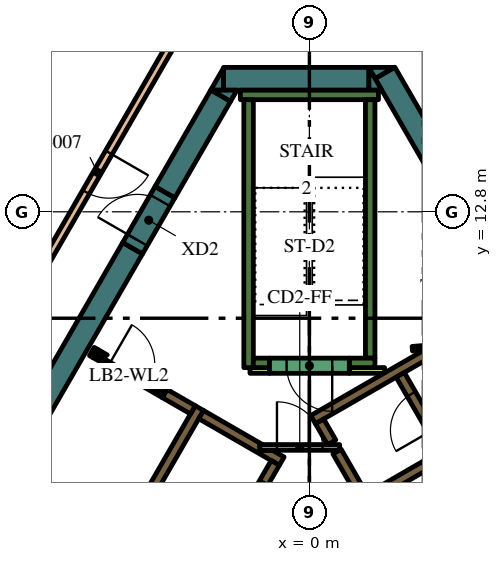
"""IFC4 building model, lengths in metres.
Left out: names, types, materials, properties, quantities, classifications, styles, units other than length and angle.
Written with IfcOpenShell. Run it as: python <this file> out.ifc"""

import sys

from ifc_helpers import new_model, si_unit, direction, frame, frame_2d, origin, place, context, subcontext, project, spatial, polyline, rectangle, outline, extrude, element, fill, save


model = new_model("IFC4")
c1 = context("Model", 3, precision=1e-05, world=origin(), true_north=direction((0.0, 1.0)))
c2 = subcontext(c1, "Body", "Model", "MODEL_VIEW")
j1 = project(units=[si_unit("LENGTHUNIT", "METRE"), si_unit("PLANEANGLEUNIT", "RADIAN")], contexts=[c1])
p1 = place(None, origin())
s1 = spatial("IfcSite", under=j1, at=p1, CompositionType="ELEMENT")
p2 = place(p1, origin())
s2 = spatial("IfcBuilding", under=s1, at=p2, CompositionType="ELEMENT")
p3 = place(p2, frame((0.0, 0.0, 331.8)))
s3 = spatial("IfcBuildingStorey", under=s2, at=p3, CompositionType="ELEMENT", Elevation=331.8)
p4 = place(p3, frame((1.989, 16.456, 0.0), z_axis=(0.0, 0.0, 1.0), x_axis=(0.49999102663, -0.8660305845, 0.0)))
e1 = element("IfcWall", 1, at=p4, inside=s3, PredefinedType="SOLIDWALL", context=c2, shape_type="SweptSolid", body=[
    extrude(rectangle(XDim=12.406, YDim=0.6, at=frame_2d((6.203, 0.0))), origin(), (0.0, 0.0, 1.0), 4.2),
])
p5 = place(p3, origin())
e2 = element("IfcWall", 2, at=p5, inside=s3, PredefinedType="SOLIDWALL", context=c2, shape_type="SweptSolid", body=[
    extrude(outline(polyline([(1.559, 16.6), (2.235, 16.6), (1.728, 16.307), (1.559, 16.6)])), origin(), (0.0, 0.0, 1.0), 4.2),
])
p6 = place(p3, frame((-2.258, 16.3, 0.0), z_axis=(0.0, 0.0, 1.0), x_axis=(1.0, 0.0, 0.0)))
e3 = element("IfcWall", 3, at=p6, inside=s3, PredefinedType="SOLIDWALL", context=c2, shape_type="SweptSolid", body=[
    extrude(rectangle(XDim=3.823, YDim=0.6, at=frame_2d((1.912, 0.0))), origin(), (0.0, 0.0, 1.0), 4.2),
])
e4 = element("IfcWall", 4, at=p5, inside=s3, PredefinedType="SOLIDWALL", context=c2, shape_type="SweptSolid", body=[
    extrude(outline(polyline([(1.905, 16.0), (1.567, 16.0), (1.567, 16.585), (1.905, 16.0)])), origin(), (0.0, 0.0, 1.0), 4.2),
])
e5 = element("IfcWall", 5, at=p5, inside=s3, PredefinedType="SOLIDWALL", context=c2, shape_type="SweptSolid", body=[
    extrude(outline(polyline([(-2.598, 16.0), (-2.26, 16.585), (-2.26, 16.0), (-2.598, 16.0)])), origin(), (0.0, 0.0, 1.0), 4.2),
])
p7 = place(p3, frame((-2.335, 15.855, 0.0), z_axis=(0.0, 0.0, 1.0), x_axis=(-0.499960127962, -0.866048422692, 0.0)))
e6 = element("IfcWall", 6, at=p7, inside=s3, PredefinedType="SOLIDWALL", context=c2, shape_type="SweptSolid", body=[
    extrude(rectangle(XDim=2.934, YDim=0.6, at=frame_2d((1.467, 0.0))), origin(), (0.0, 0.0, 1.0), 4.2),
])
e7 = element("IfcWall", 7, at=p5, inside=s3, PredefinedType="SOLIDWALL", context=c2, shape_type="SweptSolid", body=[
    extrude(outline(polyline([(-1.905, 16.0), (-2.074, 15.707), (-2.581, 16.0), (-1.905, 16.0)])), origin(), (0.0, 0.0, 1.0), 4.2),
])
p8 = place(p3, frame((-4.652, 11.842, 0.0), z_axis=(0.0, 0.0, 1.0), x_axis=(-0.500003640647, -0.866023301845, 0.0)))
e8 = element("IfcWall", 8, at=p8, inside=s3, PredefinedType="SOLIDWALL", context=c2, shape_type="SweptSolid", body=[
    extrude(rectangle(XDim=15.858, YDim=0.6, at=frame_2d((7.929, 0.0))), origin(), (0.0, 0.0, 1.0), 4.2),
])
p9 = place(p3, frame((-1.817, 15.875, 0.0), z_axis=(0.0, 0.0, 1.0), x_axis=(1.0, 0.0, 0.0)))
e9 = element("IfcWall", 9, at=p9, inside=s3, PredefinedType="SOLIDWALL", context=c2, shape_type="SweptSolid", body=[
    extrude(rectangle(XDim=3.634, YDim=0.25, at=frame_2d((1.817, 0.0))), origin(), (0.0, 0.0, 1.0), 4.2),
])
p10 = place(p3, frame((1.6, 8.95, 0.0), z_axis=(0.0, 0.0, 1.0), x_axis=(0.0, 1.0, 0.0)))
e10 = element("IfcWall", 10, at=p10, inside=s3, PredefinedType="SOLIDWALL", context=c2, shape_type="SweptSolid", body=[
    extrude(rectangle(XDim=6.8, YDim=0.25, at=frame_2d((3.4, 0.0))), origin(), (0.0, 0.0, 1.0), 4.2),
])
p11 = place(p3, frame((1.05, 8.825, 0.0), z_axis=(0.0, 0.0, 1.0), x_axis=(1.0, 0.0, 0.0)))
e11 = element("IfcWall", 11, at=p11, inside=s3, PredefinedType="SOLIDWALL", context=c2, shape_type="SweptSolid", body=[
    extrude(rectangle(XDim=0.675, YDim=0.25, at=frame_2d((0.337, 0.0))), origin(), (0.0, 0.0, 1.0), 4.2),
])
p12 = place(p3, frame((-1.6, 8.7, 0.0), z_axis=(0.0, 0.0, 1.0), x_axis=(0.0, 1.0, 0.0)))
e12 = element("IfcWall", 12, at=p12, inside=s3, PredefinedType="SOLIDWALL", context=c2, shape_type="SweptSolid", body=[
    extrude(rectangle(XDim=7.05, YDim=0.25, at=frame_2d((3.525, 0.0))), origin(), (0.0, 0.0, 1.0), 4.2),
])
p13 = place(p3, frame((-1.475, 8.825, 0.0), z_axis=(0.0, 0.0, 1.0), x_axis=(1.0, 0.0, 0.0)))
e13 = element("IfcWall", 13, at=p13, inside=s3, PredefinedType="SOLIDWALL", context=c2, shape_type="SweptSolid", body=[
    extrude(rectangle(XDim=0.425, YDim=0.25, at=frame_2d((0.212, 0.0))), origin(), (0.0, 0.0, 1.0), 4.2),
])
p14 = place(p3, frame((3.1, 9.064, 0.0), z_axis=(0.0, 0.0, 1.0), x_axis=(-0.866033137035, -0.499986605379, 0.0)))
e14 = element("IfcWall", 14, at=p14, inside=s3, PredefinedType="SOLIDWALL", context=c2, shape_type="SweptSolid", body=[
    extrude(rectangle(XDim=3.467, YDim=0.25, at=frame_2d((1.733, 0.0))), origin(), (0.0, 0.0, 1.0), 4.2),
])
p15 = place(p3, frame((0.268, 7.285, 0.0), z_axis=(0.0, 0.0, 1.0), x_axis=(0.500098681536, -0.865968422476, 0.0)))
e15 = element("IfcWall", 15, at=p15, inside=s3, PredefinedType="SOLIDWALL", context=c2, shape_type="SweptSolid", body=[
    extrude(rectangle(XDim=0.636, YDim=0.25, at=frame_2d((0.318, 0.0))), origin(), (0.0, 0.0, 1.0), 4.2),
])
p16 = place(p3, frame((5.97, -2.591, 0.0), z_axis=(0.0, 0.0, 1.0), x_axis=(-0.499994469932, 0.866028596547, 0.0)))
e16 = element("IfcWall", 16, at=p16, inside=s3, PredefinedType="SOLIDWALL", context=c2, shape_type="SweptSolid", body=[
    extrude(rectangle(XDim=10.488, YDim=0.25, at=frame_2d((5.244, 0.0))), origin(), (0.0, 0.0, 1.0), 4.2),
])
p17 = place(p3, frame((1.574, 5.274, 0.0), z_axis=(0.0, 0.0, 1.0), x_axis=(0.866028486751, 0.499994660107, 0.0)))
e17 = element("IfcWall", 17, at=p17, inside=s3, PredefinedType="SOLIDWALL", context=c2, shape_type="SweptSolid", body=[
    extrude(rectangle(XDim=2.2, YDim=0.25, at=frame_2d((1.1, 0.0))), origin(), (0.0, 0.0, 1.0), 4.2),
])
p18 = place(p3, frame((-8.06, -1.311, 0.0), z_axis=(0.0, 0.0, 1.0), x_axis=(0.50000273126, 0.866023826885, 0.0)))
e18 = element("IfcWall", 18, at=p18, inside=s3, PredefinedType="SOLIDWALL", context=c2, shape_type="SweptSolid", body=[
    extrude(rectangle(XDim=10.33, YDim=0.25, at=frame_2d((5.165, 0.0))), origin(), (0.0, 0.0, 1.0), 4.2),
])
e19 = element("IfcWall", 19, at=p5, inside=s3, PredefinedType="SOLIDWALL", context=c2, shape_type="SweptSolid", body=[
    extrude(outline(polyline([(-2.912, 7.356), (-2.787, 7.573), (-1.232, 6.675), (-1.303, 6.675), (-1.304, 6.675), (-1.304, 6.675), (-1.304, 6.525), (-1.304, 6.525), (-1.303, 6.525), (-0.971, 6.525), (-0.665, 6.348), (-0.79, 6.132), (-1.007, 6.257), (-1.007, 6.257), (-2.912, 7.356)])), origin(), (0.0, 0.0, 1.0), 4.2),
])
p19 = place(p3, frame((-5.725, 9.125, 0.0), z_axis=(0.0, 0.0, 1.0), x_axis=(0.866185586049, -0.49972245349, 0.0)))
e20 = element("IfcWall", 20, at=p19, inside=s3, PredefinedType="SOLIDWALL", context=c2, shape_type="SweptSolid", body=[
    extrude(rectangle(XDim=0.11, YDim=0.25, at=frame_2d((0.055, 0.0))), origin(), (0.0, 0.0, 1.0), 4.2),
])
p20 = place(p3, frame((-3.066, 7.59, 0.0), z_axis=(0.0, 0.0, 1.0), x_axis=(-0.866081358704, 0.49990307071, 0.0)))
e21 = element("IfcWall", 21, at=p20, inside=s3, PredefinedType="SOLIDWALL", context=c2, shape_type="SweptSolid", body=[
    extrude(rectangle(XDim=0.858, YDim=0.25, at=frame_2d((0.429, 0.0))), origin(), (0.0, 0.0, 1.0), 4.2),
])
e22 = element("IfcWall", 22, at=p5, inside=s3, PredefinedType="SOLIDWALL", context=c2, shape_type="SweptSolid", body=[
    extrude(outline(polyline([(-3.748, 8.128), (-3.813, 8.015), (-4.027, 8.139), (-4.017, 8.156), (-4.008, 8.173), (-4.0, 8.192), (-3.995, 8.21), (-3.991, 8.23), (-3.99, 8.25), (-3.99, 8.268), (-3.748, 8.128)])), origin(), (0.0, 0.0, 1.0), 4.2),
])
e23 = element("IfcWall", 23, at=p5, inside=s3, PredefinedType="SOLIDWALL", context=c2, shape_type="SweptSolid", body=[
    extrude(outline(polyline([(-5.689, 8.96), (-5.69, 8.961), (-5.565, 9.177), (-5.319, 9.035), (-5.335, 9.026), (-5.351, 9.015), (-5.366, 9.002), (-5.379, 8.988), (-5.392, 8.972), (-5.402, 8.956), (-5.412, 8.939), (-5.629, 9.064), (-5.629, 9.064), (-5.689, 8.96)])), origin(), (0.0, 0.0, 1.0), 4.2),
])
p21 = place(p3, frame((1.05, 8.625, 0.0), z_axis=(0.0, 0.0, 1.0), x_axis=(1.0, 0.0, 0.0)))
e24 = element("IfcWall", 24, at=p21, inside=s3, PredefinedType="PARTITIONING", context=c2, shape_type="SweptSolid", body=[
    extrude(rectangle(XDim=0.929, YDim=0.15, at=frame_2d((0.464, 0.0))), origin(), (0.0, 0.0, 1.0), 3.45),
])
p22 = place(p3, frame((-1.564, 8.625, 0.0), z_axis=(0.0, 0.0, 1.0), x_axis=(1.0, 0.0, 0.0)))
e25 = element("IfcWall", 25, at=p22, inside=s3, PredefinedType="PARTITIONING", context=c2, shape_type="SweptSolid", body=[
    extrude(rectangle(XDim=0.514, YDim=0.15, at=frame_2d((0.257, 0.0))), origin(), (0.0, 0.0, 1.0), 3.45),
])
p23 = place(p3, frame((8.565, -2.185, 0.0), z_axis=(0.0, 0.0, 1.0), x_axis=(-0.499997954832, 0.866026584559, 0.0)))
e26 = element("IfcWall", 26, at=p23, inside=s3, PredefinedType="SOLIDWALL", context=c2, shape_type="SweptSolid", body=[
    extrude(rectangle(XDim=12.35, YDim=0.25, at=frame_2d((6.175, 0.0))), origin(), (0.0, 0.0, 1.0), 4.2),
])
p24 = place(p23, frame((0.685, 0.0, 0.0)))
e27 = element("IfcOpeningElement", 27, at=p24, cuts=e26, PredefinedType="OPENING", context=c2, shape_type="SweptSolid", body=[
    extrude(rectangle(XDim=0.9, YDim=2.1, at=frame_2d((0.45, 1.05))), frame((0.0, 0.135, 0.0), z_axis=(0.0, -1.0, 0.0), x_axis=(1.0, 0.0, 0.0)), (0.0, 0.0, 1.0), 0.27),
])
p25 = place(p23, frame((3.105, 0.0, 0.0)))
e28 = element("IfcOpeningElement", 28, at=p25, cuts=e26, PredefinedType="OPENING", context=c2, shape_type="SweptSolid", body=[
    extrude(rectangle(XDim=1.1, YDim=2.1, at=frame_2d((0.55, 1.05))), frame((0.0, 0.135, 0.0), z_axis=(0.0, -1.0, 0.0), x_axis=(1.0, 0.0, 0.0)), (0.0, 0.0, 1.0), 0.27),
])
p26 = place(p23, frame((5.625, 0.0, 0.0)))
e29 = element("IfcOpeningElement", 29, at=p26, cuts=e26, PredefinedType="OPENING", context=c2, shape_type="SweptSolid", body=[
    extrude(rectangle(XDim=1.1, YDim=2.1, at=frame_2d((0.55, 1.05))), frame((0.0, 0.135, 0.0), z_axis=(0.0, -1.0, 0.0), x_axis=(1.0, 0.0, 0.0)), (0.0, 0.0, 1.0), 0.27),
])
p27 = place(p23, frame((8.145, 0.0, 0.0)))
e30 = element("IfcOpeningElement", 30, at=p27, cuts=e26, PredefinedType="OPENING", context=c2, shape_type="SweptSolid", body=[
    extrude(rectangle(XDim=1.1, YDim=2.1, at=frame_2d((0.55, 1.05))), frame((0.0, 0.135, 0.0), z_axis=(0.0, -1.0, 0.0), x_axis=(1.0, 0.0, 0.0)), (0.0, 0.0, 1.0), 0.27),
])
p28 = place(p23, frame((10.665, 0.0, 0.0)))
e31 = element("IfcOpeningElement", 31, at=p28, cuts=e26, PredefinedType="OPENING", context=c2, shape_type="SweptSolid", body=[
    extrude(rectangle(XDim=1.1, YDim=2.1, at=frame_2d((0.55, 1.05))), frame((0.0, 0.135, 0.0), z_axis=(0.0, -1.0, 0.0), x_axis=(1.0, 0.0, 0.0)), (0.0, 0.0, 1.0), 0.27),
])
p29 = place(p3, frame((-0.898, 6.194, 0.0), z_axis=(0.0, 0.0, 1.0), x_axis=(-0.499996202215, -0.866027596426, 0.0)))
e32 = element("IfcWall", 32, at=p29, inside=s3, PredefinedType="SOLIDWALL", context=c2, shape_type="SweptSolid", body=[
    extrude(rectangle(XDim=9.83, YDim=0.25, at=frame_2d((4.915, 0.0))), origin(), (0.0, 0.0, 1.0), 4.2),
])
p30 = place(p29, frame((0.585, 0.0, 0.0)))
e33 = element("IfcOpeningElement", 33, at=p30, cuts=e32, PredefinedType="OPENING", context=c2, shape_type="SweptSolid", body=[
    extrude(rectangle(XDim=1.1, YDim=2.1, at=frame_2d((0.55, 1.05))), frame((0.0, 0.135, 0.0), z_axis=(0.0, -1.0, 0.0), x_axis=(1.0, 0.0, 0.0)), (0.0, 0.0, 1.0), 0.27),
])
p31 = place(p29, frame((3.105, 0.0, 0.0)))
e34 = element("IfcOpeningElement", 34, at=p31, cuts=e32, PredefinedType="OPENING", context=c2, shape_type="SweptSolid", body=[
    extrude(rectangle(XDim=1.1, YDim=2.1, at=frame_2d((0.55, 1.05))), frame((0.0, 0.135, 0.0), z_axis=(0.0, -1.0, 0.0), x_axis=(1.0, 0.0, 0.0)), (0.0, 0.0, 1.0), 0.27),
])
p32 = place(p29, frame((5.625, 0.0, 0.0)))
e35 = element("IfcOpeningElement", 35, at=p32, cuts=e32, PredefinedType="OPENING", context=c2, shape_type="SweptSolid", body=[
    extrude(rectangle(XDim=1.1, YDim=2.1, at=frame_2d((0.55, 1.05))), frame((0.0, 0.135, 0.0), z_axis=(0.0, -1.0, 0.0), x_axis=(1.0, 0.0, 0.0)), (0.0, 0.0, 1.0), 0.27),
])
p33 = place(p29, frame((8.145, 0.0, 0.0)))
e36 = element("IfcOpeningElement", 36, at=p33, cuts=e32, PredefinedType="OPENING", context=c2, shape_type="SweptSolid", body=[
    extrude(rectangle(XDim=1.1, YDim=2.1, at=frame_2d((0.55, 1.05))), frame((0.0, 0.135, 0.0), z_axis=(0.0, -1.0, 0.0), x_axis=(1.0, 0.0, 0.0)), (0.0, 0.0, 1.0), 0.27),
])
p34 = place(p3, frame((1.05, 8.75, 0.0), z_axis=(0.0, 0.0, 1.0), x_axis=(-1.0, 0.0, 0.0)))
e37 = element("IfcWall", 37, at=p34, inside=s3, PredefinedType="SOLIDWALL", context=c2, shape_type="SweptSolid", body=[
    extrude(rectangle(XDim=2.1, YDim=0.4, at=frame_2d((1.05, 0.0))), origin(), (0.0, 0.0, 1.0), 4.2),
])
p35 = place(p34, frame((0.45, 0.0, 0.0)))
e38 = element("IfcOpeningElement", 38, at=p35, cuts=e37, PredefinedType="OPENING", context=c2, shape_type="SweptSolid", body=[
    extrude(rectangle(XDim=1.2, YDim=2.1, at=frame_2d((0.6, 1.05))), frame((0.0, 0.21, 0.0), z_axis=(0.0, -1.0, 0.0), x_axis=(1.0, 0.0, 0.0)), (0.0, 0.0, 1.0), 0.42),
])
p36 = place(p3, frame((5.398, 9.419, 0.0), z_axis=(0.0, 0.0, 1.0), x_axis=(-0.996653416376, -0.081743303248, 0.0)))
e39 = element("IfcWall", 39, at=p36, inside=s3, PredefinedType="PARTITIONING", context=c2, shape_type="SweptSolid", body=[
    extrude(rectangle(XDim=2.7, YDim=0.12, at=frame_2d((1.35, 0.0))), origin(), (0.0, 0.0, 1.0), 3.45),
])
p37 = place(p36, frame((1.45, 0.0, 0.0)))
e40 = element("IfcOpeningElement", 40, at=p37, cuts=e39, PredefinedType="OPENING", context=c2, shape_type="SweptSolid", body=[
    extrude(rectangle(XDim=0.9, YDim=2.1, at=frame_2d((0.45, 1.05))), frame((0.0, 0.07, 0.0), z_axis=(0.0, -1.0, 0.0), x_axis=(1.0, 0.0, 0.0)), (0.0, 0.0, 1.0), 0.14),
])
p38 = place(p3, frame((-1.303, 6.6, 0.0), z_axis=(0.0, 0.0, 1.0), x_axis=(1.0, 0.0, 0.0)))
e41 = element("IfcWall", 41, at=p38, inside=s3, PredefinedType="PARTITIONING", context=c2, shape_type="SweptSolid", body=[
    extrude(rectangle(XDim=2.1, YDim=0.15, at=frame_2d((1.05, 0.0))), origin(), (0.0, 0.0, 1.0), 4.2),
])
p39 = place(p38, frame((0.45, 0.0, 0.0)))
e42 = element("IfcOpeningElement", 42, at=p39, cuts=e41, PredefinedType="OPENING", context=c2, shape_type="SweptSolid", body=[
    extrude(rectangle(XDim=1.2, YDim=2.1, at=frame_2d((0.6, 1.05))), frame((0.0, 0.085, 0.0), z_axis=(0.0, -1.0, 0.0), x_axis=(1.0, 0.0, 0.0)), (0.0, 0.0, 1.0), 0.17),
])
p40 = place(p3, frame((-5.659, 9.012, 0.0), z_axis=(0.0, 0.0, 1.0), x_axis=(0.866009402589, -0.500027713859, 0.0)))
e43 = element("IfcWall", 43, at=p40, inside=s3, PredefinedType="PARTITIONING", context=c2, shape_type="SweptSolid", body=[
    extrude(rectangle(XDim=2.1, YDim=0.12, at=frame_2d((1.05, 0.0))), origin(), (0.0, 0.0, 1.0), 3.45),
])
p41 = place(p40, frame((0.45, 0.0, 0.0)))
e44 = element("IfcOpeningElement", 44, at=p41, cuts=e43, PredefinedType="OPENING", context=c2, shape_type="SweptSolid", body=[
    extrude(rectangle(XDim=1.2, YDim=2.1, at=frame_2d((0.6, 1.05))), frame((0.0, 0.07, 0.0), z_axis=(0.0, -1.0, 0.0), x_axis=(1.0, 0.0, 0.0)), (0.0, 0.0, 1.0), 0.14),
])
p42 = place(p3, frame((-4.652, 11.842, 0.0), z_axis=(0.0, 0.0, 1.0), x_axis=(0.500062241894, 0.865989465428, 0.0)))
e45 = element("IfcWall", 45, at=p42, inside=s3, PredefinedType="SOLIDWALL", context=c2, shape_type="SweptSolid", body=[
    extrude(rectangle(XDim=1.7, YDim=0.6, at=frame_2d((0.85, 0.0))), origin(), (0.0, 0.0, 1.0), 4.2),
])
p43 = place(p42, frame((0.25, 0.0, 0.0)))
e46 = element("IfcOpeningElement", 46, at=p43, cuts=e45, PredefinedType="OPENING", context=c2, shape_type="SweptSolid", body=[
    extrude(rectangle(XDim=1.2, YDim=2.1, at=frame_2d((0.6, 1.05))), frame((0.0, 0.31, 0.0), z_axis=(0.0, -1.0, 0.0), x_axis=(1.0, 0.0, 0.0)), (0.0, 0.0, 1.0), 0.62),
])
p44 = place(p3, frame((-3.118, 18.1, 0.0), z_axis=(0.0, 0.0, 1.0), x_axis=(-0.500003092839, -0.866023618125, 0.0)))
e47 = element("IfcWall", 47, at=p44, inside=s3, PredefinedType="PARTITIONING", context=c2, shape_type="SweptSolid", body=[
    extrude(rectangle(XDim=9.84, YDim=0.2, at=frame_2d((4.92, 0.0))), origin(), (0.0, 0.0, 1.0), 3.45),
])
p45 = place(p44, frame((4.32, 0.0, 0.0)))
e48 = element("IfcOpeningElement", 48, at=p45, cuts=e47, PredefinedType="OPENING", context=c2, shape_type="SweptSolid", body=[
    extrude(rectangle(XDim=1.2, YDim=2.1, at=frame_2d((0.6, 1.05))), frame((0.0, 0.11, 0.0), z_axis=(0.0, -1.0, 0.0), x_axis=(1.0, 0.0, 0.0)), (0.0, 0.0, 1.0), 0.22),
])
p46 = place(p3, frame((-6.808, 17.908, 0.0), z_axis=(0.0, 0.0, 1.0), x_axis=(-0.499977492351, -0.866038398192, 0.0)))
e49 = element("IfcWall", 49, at=p46, inside=s3, PredefinedType="SOLIDWALL", context=c2, shape_type="SweptSolid", body=[
    extrude(rectangle(XDim=1.464, YDim=0.3, at=frame_2d((0.732, 0.0))), origin(), (0.0, 0.0, 1.0), 3.95),
])
p47 = place(p28, origin())
e50 = element("IfcDoor", 50, at=p47, inside=s3, OperationType="DOUBLE_DOOR_SLIDING", PredefinedType="DOOR", context=c2, shape_type="SweptSolid", body=[
    extrude(rectangle(XDim=1.1, YDim=2.1, at=frame_2d((0.55, 1.05))), frame((0.0, 0.025, 0.0), z_axis=(0.0, -1.0, 0.0), x_axis=(1.0, 0.0, 0.0)), (0.0, 0.0, 1.0), 0.05),
])
fill(e31, e50)
p48 = place(p30, origin())
e51 = element("IfcDoor", 51, at=p48, inside=s3, OperationType="DOUBLE_DOOR_SLIDING", PredefinedType="DOOR", context=c2, shape_type="SweptSolid", body=[
    extrude(rectangle(XDim=1.1, YDim=2.1, at=frame_2d((0.55, 1.05))), frame((0.0, 0.025, 0.0), z_axis=(0.0, -1.0, 0.0), x_axis=(1.0, 0.0, 0.0)), (0.0, 0.0, 1.0), 0.05),
])
fill(e33, e51)
p49 = place(p35, origin())
e52 = element("IfcDoor", 52, at=p49, inside=s3, OperationType="SINGLE_SWING_LEFT", PredefinedType="DOOR", context=c2, shape_type="SweptSolid", body=[
    extrude(rectangle(XDim=1.2, YDim=2.1, at=frame_2d((0.6, 1.05))), frame((0.0, 0.025, 0.0), z_axis=(0.0, -1.0, 0.0), x_axis=(1.0, 0.0, 0.0)), (0.0, 0.0, 1.0), 0.05),
])
fill(e38, e52)
p50 = place(p39, origin())
e53 = element("IfcDoor", 53, at=p50, inside=s3, OperationType="SINGLE_SWING_LEFT", PredefinedType="DOOR", context=c2, shape_type="SweptSolid", body=[
    extrude(rectangle(XDim=1.2, YDim=2.1, at=frame_2d((0.6, 1.05))), frame((0.0, 0.025, 0.0), z_axis=(0.0, -1.0, 0.0), x_axis=(1.0, 0.0, 0.0)), (0.0, 0.0, 1.0), 0.05),
])
fill(e42, e53)
p51 = place(p41, origin())
e54 = element("IfcDoor", 54, at=p51, inside=s3, OperationType="SINGLE_SWING_LEFT", PredefinedType="DOOR", context=c2, shape_type="SweptSolid", body=[
    extrude(rectangle(XDim=1.2, YDim=2.1, at=frame_2d((0.6, 1.05))), frame((0.0, 0.025, 0.0), z_axis=(0.0, -1.0, 0.0), x_axis=(1.0, 0.0, 0.0)), (0.0, 0.0, 1.0), 0.05),
])
fill(e44, e54)
p52 = place(p43, origin())
e55 = element("IfcDoor", 55, at=p52, inside=s3, OperationType="SINGLE_SWING_LEFT", PredefinedType="DOOR", context=c2, shape_type="SweptSolid", body=[
    extrude(rectangle(XDim=1.2, YDim=2.1, at=frame_2d((0.6, 1.05))), frame((0.0, 0.025, 0.0), z_axis=(0.0, -1.0, 0.0), x_axis=(1.0, 0.0, 0.0)), (0.0, 0.0, 1.0), 0.05),
])
fill(e46, e55)
p53 = place(p45, origin())
e56 = element("IfcDoor", 56, at=p53, inside=s3, OperationType="SINGLE_SWING_RIGHT", PredefinedType="DOOR", context=c2, shape_type="SweptSolid", body=[
    extrude(rectangle(XDim=1.2, YDim=2.1, at=frame_2d((0.6, 1.05))), frame((0.0, 0.025, 0.0), z_axis=(0.0, -1.0, 0.0), x_axis=(1.0, 0.0, 0.0)), (0.0, 0.0, 1.0), 0.05),
])
fill(e48, e56)
save(model, sys.argv[1])
